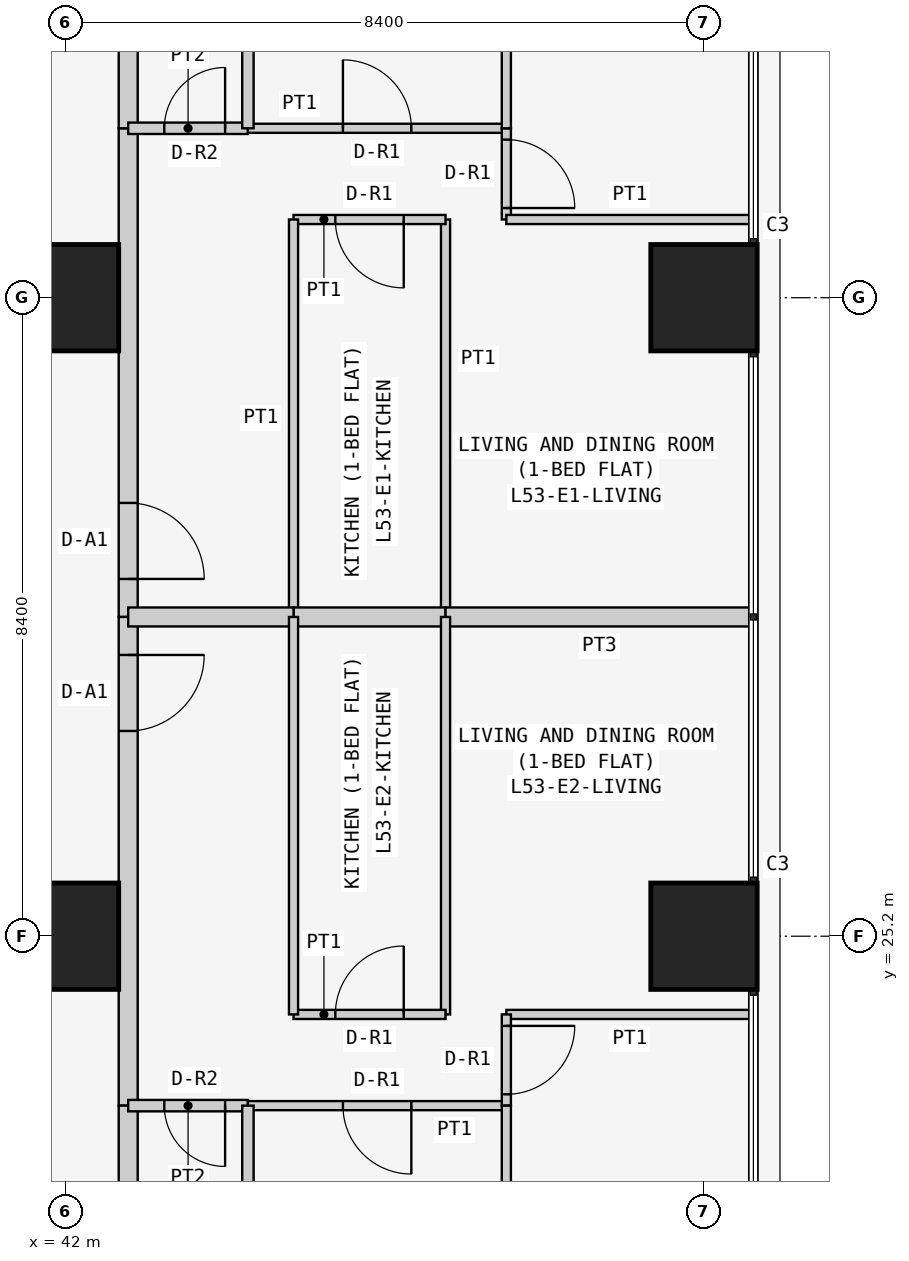
"""IFC4 building model, lengths in metres.
Left out: names, types, materials, properties, quantities, classifications, styles, units other than length and angle.
Written with IfcOpenShell. Run it as: python <this file> out.ifc"""

import sys

from ifc_helpers import new_model, si_unit, direction, frame, frame_2d, origin, origin_2d, place, context, subcontext, project, spatial, rectangle, extrude, element, fill, save


model = new_model("IFC4")
c1 = context("Model", 3, precision=1e-05, world=origin(), true_north=direction((0.0, 1.0)))
c2 = subcontext(c1, "Body", "Model", "MODEL_VIEW")
j1 = project(units=[si_unit("LENGTHUNIT", "METRE"), si_unit("PLANEANGLEUNIT", "RADIAN")], contexts=[c1])
p1 = place(None, origin())
s1 = spatial("IfcSite", under=j1, at=p1, CompositionType="ELEMENT")
p2 = place(p1, origin())
s2 = spatial("IfcBuilding", under=s1, at=p2, CompositionType="ELEMENT")
p3 = place(p2, frame((0.0, 0.0, 204.9)))
s3 = spatial("IfcBuildingStorey", under=s2, at=p3, CompositionType="ELEMENT", Elevation=204.9)
for number, where, z_axis, x_axis in (
    (1, (42.0, 25.2, 0.0), (0.0, 0.0, 1.0), (1.0, 0.0, 0.0)),
    (2, (42.0, 33.6, 0.0), (0.0, 0.0, 1.0), (1.0, 0.0, 0.0)),
    (3, (50.4, 25.2, 0.0), (0.0, 0.0, 1.0), (1.0, 0.0, 0.0)),
    (4, (50.4, 33.6, 0.0), (0.0, 0.0, 1.0), (1.0, 0.0, 0.0)),
):
    element("IfcColumn", number, at=place(p3, frame(where, z_axis=z_axis, x_axis=x_axis)), inside=s3, PredefinedType="COLUMN", context=c2, shape_type="SweptSolid", body=[
        extrude(rectangle(XDim=1.4, YDim=1.4, at=origin_2d()), origin(), (0.0, 0.0, 1.0), 3.6),
    ])
p4 = place(p3, frame((42.825, 35.829, 0.0), z_axis=(0.0, 0.0, 1.0), x_axis=(0.0, -1.0, 0.0)))
e5 = element("IfcWall", 5, at=p4, inside=s3, PredefinedType="PARTITIONING", context=c2, shape_type="SweptSolid", body=[
    extrude(rectangle(XDim=6.429, YDim=0.25, at=frame_2d((3.215, 0.0))), origin(), (0.0, 0.0, 1.0), 3.45),
])
p5 = place(p4, frame((4.929, 0.0, 0.0)))
e6 = element("IfcOpeningElement", 6, at=p5, cuts=e5, PredefinedType="OPENING", context=c2, shape_type="SweptSolid", body=[
    extrude(rectangle(XDim=1.0, YDim=2.1, at=frame_2d((0.5, 1.05))), frame((0.0, 0.135, 0.0), z_axis=(0.0, -1.0, 0.0), x_axis=(1.0, 0.0, 0.0)), (0.0, 0.0, 1.0), 0.27),
])
p6 = place(p3, frame((42.825, 42.7, 0.0), z_axis=(0.0, 0.0, 1.0), x_axis=(0.0, -1.0, 0.0)))
e7 = element("IfcWall", 7, at=p6, inside=s3, PredefinedType="PARTITIONING", context=c2, shape_type="SweptSolid", body=[
    extrude(rectangle(XDim=6.871, YDim=0.25, at=frame_2d((3.436, 0.0))), origin(), (0.0, 0.0, 1.0), 3.45),
])
p7 = place(p3, frame((42.825, 29.4, 0.0), z_axis=(0.0, 0.0, 1.0), x_axis=(0.0, -1.0, 0.0)))
e8 = element("IfcWall", 8, at=p7, inside=s3, PredefinedType="PARTITIONING", context=c2, shape_type="SweptSolid", body=[
    extrude(rectangle(XDim=6.429, YDim=0.25, at=frame_2d((3.214, 0.0))), origin(), (0.0, 0.0, 1.0), 3.45),
])
p8 = place(p7, frame((0.5, 0.0, 0.0)))
e9 = element("IfcOpeningElement", 9, at=p8, cuts=e8, PredefinedType="OPENING", context=c2, shape_type="SweptSolid", body=[
    extrude(rectangle(XDim=1.0, YDim=2.1, at=frame_2d((0.5, 1.05))), frame((0.0, 0.135, 0.0), z_axis=(0.0, -1.0, 0.0), x_axis=(1.0, 0.0, 0.0)), (0.0, 0.0, 1.0), 0.27),
])
p9 = place(p3, frame((42.825, 22.971, 0.0), z_axis=(0.0, 0.0, 1.0), x_axis=(0.0, -1.0, 0.0)))
e10 = element("IfcWall", 10, at=p9, inside=s3, PredefinedType="PARTITIONING", context=c2, shape_type="SweptSolid", body=[
    extrude(rectangle(XDim=6.871, YDim=0.25, at=frame_2d((3.436, 0.0))), origin(), (0.0, 0.0, 1.0), 3.45),
])
p10 = place(p3, frame((47.0, 29.4, 0.0), z_axis=(0.0, 0.0, 1.0), x_axis=(0.0, 1.0, 0.0)))
e11 = element("IfcWall", 11, at=p10, inside=s3, PredefinedType="PARTITIONING", context=c2, shape_type="SweptSolid", body=[
    extrude(rectangle(XDim=5.229, YDim=0.12, at=frame_2d((2.615, 0.0))), origin(), (0.0, 0.0, 1.0), 3.45),
])
p11 = place(p3, frame((47.0, 34.629, 0.0), z_axis=(0.0, 0.0, 1.0), x_axis=(-1.0, 0.0, 0.0)))
e12 = element("IfcWall", 12, at=p11, inside=s3, PredefinedType="PARTITIONING", context=c2, shape_type="SweptSolid", body=[
    extrude(rectangle(XDim=2.0, YDim=0.12, at=frame_2d((1.0, 0.0))), origin(), (0.0, 0.0, 1.0), 3.45),
])
p12 = place(p11, frame((0.55, 0.0, 0.0)))
e13 = element("IfcOpeningElement", 13, at=p12, cuts=e12, PredefinedType="OPENING", context=c2, shape_type="SweptSolid", body=[
    extrude(rectangle(XDim=0.9, YDim=2.1, at=frame_2d((0.45, 1.05))), frame((0.0, 0.07, 0.0), z_axis=(0.0, -1.0, 0.0), x_axis=(1.0, 0.0, 0.0)), (0.0, 0.0, 1.0), 0.14),
])
p13 = place(p3, frame((45.0, 34.629, 0.0), z_axis=(0.0, 0.0, 1.0), x_axis=(0.0, -1.0, 0.0)))
e14 = element("IfcWall", 14, at=p13, inside=s3, PredefinedType="PARTITIONING", context=c2, shape_type="SweptSolid", body=[
    extrude(rectangle(XDim=5.229, YDim=0.12, at=frame_2d((2.615, 0.0))), origin(), (0.0, 0.0, 1.0), 3.45),
])
p14 = place(p3, frame((45.0, 29.4, 0.0), z_axis=(0.0, 0.0, 1.0), x_axis=(1.0, 0.0, 0.0)))
e15 = element("IfcWall", 15, at=p14, inside=s3, PredefinedType="PARTITIONING", context=c2, shape_type="SweptSolid", body=[
    extrude(rectangle(XDim=2.0, YDim=0.25, at=frame_2d((1.0, 0.0))), origin(), (0.0, 0.0, 1.0), 3.45),
])
p15 = place(p3, frame((42.825, 35.829, 0.0), z_axis=(0.0, 0.0, 1.0), x_axis=(1.0, 0.0, 0.0)))
e16 = element("IfcWall", 16, at=p15, inside=s3, PredefinedType="PARTITIONING", context=c2, shape_type="SweptSolid", body=[
    extrude(rectangle(XDim=1.575, YDim=0.15, at=frame_2d((0.788, 0.0))), origin(), (0.0, 0.0, 1.0), 3.45),
])
p16 = place(p15, frame((0.475, 0.0, 0.0)))
e17 = element("IfcOpeningElement", 17, at=p16, cuts=e16, PredefinedType="OPENING", context=c2, shape_type="SweptSolid", body=[
    extrude(rectangle(XDim=0.8, YDim=2.1, at=frame_2d((0.4, 1.05))), frame((0.0, 0.085, 0.0), z_axis=(0.0, -1.0, 0.0), x_axis=(1.0, 0.0, 0.0)), (0.0, 0.0, 1.0), 0.17),
])
p17 = place(p3, frame((44.4, 35.829, 0.0), z_axis=(0.0, 0.0, 1.0), x_axis=(1.0, 0.0, 0.0)))
e18 = element("IfcWall", 18, at=p17, inside=s3, PredefinedType="PARTITIONING", context=c2, shape_type="SweptSolid", body=[
    extrude(rectangle(XDim=3.4, YDim=0.12, at=frame_2d((1.7, 0.0))), origin(), (0.0, 0.0, 1.0), 3.45),
])
p18 = place(p17, frame((1.25, 0.0, 0.0)))
e19 = element("IfcOpeningElement", 19, at=p18, cuts=e18, PredefinedType="OPENING", context=c2, shape_type="SweptSolid", body=[
    extrude(rectangle(XDim=0.9, YDim=2.1, at=frame_2d((0.45, 1.05))), frame((0.0, 0.07, 0.0), z_axis=(0.0, -1.0, 0.0), x_axis=(1.0, 0.0, 0.0)), (0.0, 0.0, 1.0), 0.14),
])
p19 = place(p3, frame((47.8, 35.829, 0.0), z_axis=(0.0, 0.0, 1.0), x_axis=(0.0, -1.0, 0.0)))
e20 = element("IfcWall", 20, at=p19, inside=s3, PredefinedType="PARTITIONING", context=c2, shape_type="SweptSolid", body=[
    extrude(rectangle(XDim=1.2, YDim=0.12, at=frame_2d((0.6, 0.0))), origin(), (0.0, 0.0, 1.0), 3.45),
])
p20 = place(p19, frame((0.149, 0.0, 0.0)))
e21 = element("IfcOpeningElement", 21, at=p20, cuts=e20, PredefinedType="OPENING", context=c2, shape_type="SweptSolid", body=[
    extrude(rectangle(XDim=0.9, YDim=2.1, at=frame_2d((0.45, 1.05))), frame((0.0, 0.07, 0.0), z_axis=(0.0, -1.0, 0.0), x_axis=(1.0, 0.0, 0.0)), (0.0, 0.0, 1.0), 0.14),
])
p21 = place(p3, frame((47.8, 34.629, 0.0), z_axis=(0.0, 0.0, 1.0), x_axis=(1.0, 0.0, 0.0)))
e22 = element("IfcWall", 22, at=p21, inside=s3, PredefinedType="PARTITIONING", context=c2, shape_type="SweptSolid", body=[
    extrude(rectangle(XDim=3.25, YDim=0.12, at=frame_2d((1.625, 0.0))), origin(), (0.0, 0.0, 1.0), 3.45),
])
p22 = place(p3, frame((45.0, 29.4, 0.0), z_axis=(0.0, 0.0, 1.0), x_axis=(-1.0, 0.0, 0.0)))
e23 = element("IfcWall", 23, at=p22, inside=s3, PredefinedType="PARTITIONING", context=c2, shape_type="SweptSolid", body=[
    extrude(rectangle(XDim=2.175, YDim=0.25, at=frame_2d((1.087, 0.0))), origin(), (0.0, 0.0, 1.0), 3.45),
])
p23 = place(p3, frame((51.05, 29.4, 0.0), z_axis=(0.0, 0.0, 1.0), x_axis=(-1.0, 0.0, 0.0)))
e24 = element("IfcWall", 24, at=p23, inside=s3, PredefinedType="PARTITIONING", context=c2, shape_type="SweptSolid", body=[
    extrude(rectangle(XDim=4.05, YDim=0.25, at=frame_2d((2.025, 0.0))), origin(), (0.0, 0.0, 1.0), 3.45),
])
p24 = place(p3, frame((44.4, 35.829, 0.0), z_axis=(0.0, 0.0, 1.0), x_axis=(0.0, 1.0, 0.0)))
e25 = element("IfcWall", 25, at=p24, inside=s3, PredefinedType="PARTITIONING", context=c2, shape_type="SweptSolid", body=[
    extrude(rectangle(XDim=6.871, YDim=0.15, at=frame_2d((3.436, 0.0))), origin(), (0.0, 0.0, 1.0), 3.45),
])
p25 = place(p3, frame((47.8, 35.829, 0.0), z_axis=(0.0, 0.0, 1.0), x_axis=(0.0, 1.0, 0.0)))
e26 = element("IfcWall", 26, at=p25, inside=s3, PredefinedType="PARTITIONING", context=c2, shape_type="SweptSolid", body=[
    extrude(rectangle(XDim=6.871, YDim=0.12, at=frame_2d((3.436, 0.0))), origin(), (0.0, 0.0, 1.0), 3.45),
])
p26 = place(p3, frame((47.0, 29.4, 0.0), z_axis=(0.0, 0.0, 1.0), x_axis=(0.0, -1.0, 0.0)))
e27 = element("IfcWall", 27, at=p26, inside=s3, PredefinedType="PARTITIONING", context=c2, shape_type="SweptSolid", body=[
    extrude(rectangle(XDim=5.229, YDim=0.12, at=frame_2d((2.615, 0.0))), origin(), (0.0, 0.0, 1.0), 3.45),
])
p27 = place(p3, frame((47.0, 24.171, 0.0), z_axis=(0.0, 0.0, 1.0), x_axis=(-1.0, 0.0, 0.0)))
e28 = element("IfcWall", 28, at=p27, inside=s3, PredefinedType="PARTITIONING", context=c2, shape_type="SweptSolid", body=[
    extrude(rectangle(XDim=2.0, YDim=0.12, at=frame_2d((1.0, 0.0))), origin(), (0.0, 0.0, 1.0), 3.45),
])
p28 = place(p27, frame((0.55, 0.0, 0.0)))
e29 = element("IfcOpeningElement", 29, at=p28, cuts=e28, PredefinedType="OPENING", context=c2, shape_type="SweptSolid", body=[
    extrude(rectangle(XDim=0.9, YDim=2.1, at=frame_2d((0.45, 1.05))), frame((0.0, 0.07, 0.0), z_axis=(0.0, -1.0, 0.0), x_axis=(1.0, 0.0, 0.0)), (0.0, 0.0, 1.0), 0.14),
])
p29 = place(p3, frame((45.0, 24.171, 0.0), z_axis=(0.0, 0.0, 1.0), x_axis=(0.0, 1.0, 0.0)))
e30 = element("IfcWall", 30, at=p29, inside=s3, PredefinedType="PARTITIONING", context=c2, shape_type="SweptSolid", body=[
    extrude(rectangle(XDim=5.229, YDim=0.12, at=frame_2d((2.615, 0.0))), origin(), (0.0, 0.0, 1.0), 3.45),
])
p30 = place(p3, frame((44.4, 22.971, 0.0), z_axis=(0.0, 0.0, 1.0), x_axis=(-1.0, 0.0, 0.0)))
e31 = element("IfcWall", 31, at=p30, inside=s3, PredefinedType="PARTITIONING", context=c2, shape_type="SweptSolid", body=[
    extrude(rectangle(XDim=1.575, YDim=0.15, at=frame_2d((0.788, 0.0))), origin(), (0.0, 0.0, 1.0), 3.45),
])
p31 = place(p30, frame((0.3, 0.0, 0.0)))
e32 = element("IfcOpeningElement", 32, at=p31, cuts=e31, PredefinedType="OPENING", context=c2, shape_type="SweptSolid", body=[
    extrude(rectangle(XDim=0.8, YDim=2.1, at=frame_2d((0.4, 1.05))), frame((0.0, 0.085, 0.0), z_axis=(0.0, -1.0, 0.0), x_axis=(1.0, 0.0, 0.0)), (0.0, 0.0, 1.0), 0.17),
])
p32 = place(p3, frame((47.8, 22.971, 0.0), z_axis=(0.0, 0.0, 1.0), x_axis=(-1.0, 0.0, 0.0)))
e33 = element("IfcWall", 33, at=p32, inside=s3, PredefinedType="PARTITIONING", context=c2, shape_type="SweptSolid", body=[
    extrude(rectangle(XDim=3.4, YDim=0.12, at=frame_2d((1.7, 0.0))), origin(), (0.0, 0.0, 1.0), 3.45),
])
p33 = place(p32, frame((1.25, 0.0, 0.0)))
e34 = element("IfcOpeningElement", 34, at=p33, cuts=e33, PredefinedType="OPENING", context=c2, shape_type="SweptSolid", body=[
    extrude(rectangle(XDim=0.9, YDim=2.1, at=frame_2d((0.45, 1.05))), frame((0.0, 0.07, 0.0), z_axis=(0.0, -1.0, 0.0), x_axis=(1.0, 0.0, 0.0)), (0.0, 0.0, 1.0), 0.14),
])
p34 = place(p3, frame((51.05, 24.171, 0.0), z_axis=(0.0, 0.0, 1.0), x_axis=(-1.0, 0.0, 0.0)))
e35 = element("IfcWall", 35, at=p34, inside=s3, PredefinedType="PARTITIONING", context=c2, shape_type="SweptSolid", body=[
    extrude(rectangle(XDim=3.25, YDim=0.12, at=frame_2d((1.625, 0.0))), origin(), (0.0, 0.0, 1.0), 3.45),
])
p35 = place(p3, frame((47.8, 24.171, 0.0), z_axis=(0.0, 0.0, 1.0), x_axis=(0.0, -1.0, 0.0)))
e36 = element("IfcWall", 36, at=p35, inside=s3, PredefinedType="PARTITIONING", context=c2, shape_type="SweptSolid", body=[
    extrude(rectangle(XDim=1.2, YDim=0.12, at=frame_2d((0.6, 0.0))), origin(), (0.0, 0.0, 1.0), 3.45),
])
p36 = place(p35, frame((0.151, 0.0, 0.0)))
e37 = element("IfcOpeningElement", 37, at=p36, cuts=e36, PredefinedType="OPENING", context=c2, shape_type="SweptSolid", body=[
    extrude(rectangle(XDim=0.9, YDim=2.1, at=frame_2d((0.45, 1.05))), frame((0.0, 0.07, 0.0), z_axis=(0.0, -1.0, 0.0), x_axis=(1.0, 0.0, 0.0)), (0.0, 0.0, 1.0), 0.14),
])
p37 = place(p3, frame((44.4, 22.971, 0.0), z_axis=(0.0, 0.0, 1.0), x_axis=(0.0, -1.0, 0.0)))
e38 = element("IfcWall", 38, at=p37, inside=s3, PredefinedType="PARTITIONING", context=c2, shape_type="SweptSolid", body=[
    extrude(rectangle(XDim=6.871, YDim=0.15, at=frame_2d((3.436, 0.0))), origin(), (0.0, 0.0, 1.0), 3.45),
])
p38 = place(p3, frame((47.8, 22.971, 0.0), z_axis=(0.0, 0.0, 1.0), x_axis=(0.0, -1.0, 0.0)))
e39 = element("IfcWall", 39, at=p38, inside=s3, PredefinedType="PARTITIONING", context=c2, shape_type="SweptSolid", body=[
    extrude(rectangle(XDim=6.871, YDim=0.12, at=frame_2d((3.436, 0.0))), origin(), (0.0, 0.0, 1.0), 3.45),
])
p39 = place(p5, origin())
e40 = element("IfcDoor", 40, at=p39, inside=s3, OperationType="SINGLE_SWING_RIGHT", PredefinedType="DOOR", context=c2, shape_type="SweptSolid", body=[
    extrude(rectangle(XDim=1.0, YDim=2.1, at=frame_2d((0.5, 1.05))), frame((0.0, 0.025, 0.0), z_axis=(0.0, -1.0, 0.0), x_axis=(1.0, 0.0, 0.0)), (0.0, 0.0, 1.0), 0.05),
])
fill(e6, e40)
p40 = place(p12, origin())
e41 = element("IfcDoor", 41, at=p40, inside=s3, OperationType="SINGLE_SWING_LEFT", PredefinedType="DOOR", context=c2, shape_type="SweptSolid", body=[
    extrude(rectangle(XDim=0.9, YDim=2.1, at=frame_2d((0.45, 1.05))), frame((0.0, 0.025, 0.0), z_axis=(0.0, -1.0, 0.0), x_axis=(1.0, 0.0, 0.0)), (0.0, 0.0, 1.0), 0.05),
])
fill(e13, e41)
p41 = place(p16, origin())
e42 = element("IfcDoor", 42, at=p41, inside=s3, OperationType="SINGLE_SWING_RIGHT", PredefinedType="DOOR", context=c2, shape_type="SweptSolid", body=[
    extrude(rectangle(XDim=0.8, YDim=2.1, at=frame_2d((0.4, 1.05))), frame((0.0, 0.025, 0.0), z_axis=(0.0, -1.0, 0.0), x_axis=(1.0, 0.0, 0.0)), (0.0, 0.0, 1.0), 0.05),
])
fill(e17, e42)
p42 = place(p18, origin())
e43 = element("IfcDoor", 43, at=p42, inside=s3, OperationType="SINGLE_SWING_LEFT", PredefinedType="DOOR", context=c2, shape_type="SweptSolid", body=[
    extrude(rectangle(XDim=0.9, YDim=2.1, at=frame_2d((0.45, 1.05))), frame((0.0, 0.025, 0.0), z_axis=(0.0, -1.0, 0.0), x_axis=(1.0, 0.0, 0.0)), (0.0, 0.0, 1.0), 0.05),
])
fill(e19, e43)
p43 = place(p20, origin())
e44 = element("IfcDoor", 44, at=p43, inside=s3, OperationType="SINGLE_SWING_RIGHT", PredefinedType="DOOR", context=c2, shape_type="SweptSolid", body=[
    extrude(rectangle(XDim=0.9, YDim=2.1, at=frame_2d((0.45, 1.05))), frame((0.0, 0.025, 0.0), z_axis=(0.0, -1.0, 0.0), x_axis=(1.0, 0.0, 0.0)), (0.0, 0.0, 1.0), 0.05),
])
fill(e21, e44)
p44 = place(p8, origin())
e45 = element("IfcDoor", 45, at=p44, inside=s3, OperationType="SINGLE_SWING_LEFT", PredefinedType="DOOR", context=c2, shape_type="SweptSolid", body=[
    extrude(rectangle(XDim=1.0, YDim=2.1, at=frame_2d((0.5, 1.05))), frame((0.0, 0.025, 0.0), z_axis=(0.0, -1.0, 0.0), x_axis=(1.0, 0.0, 0.0)), (0.0, 0.0, 1.0), 0.05),
])
fill(e9, e45)
p45 = place(p28, frame((0.9, 0.0, 0.0), z_axis=(0.0, 0.0, 1.0), x_axis=(-1.0, 0.0, 0.0)))
e46 = element("IfcDoor", 46, at=p45, inside=s3, OperationType="SINGLE_SWING_RIGHT", PredefinedType="DOOR", context=c2, shape_type="SweptSolid", body=[
    extrude(rectangle(XDim=0.9, YDim=2.1, at=frame_2d((0.45, 1.05))), frame((0.0, 0.025, 0.0), z_axis=(0.0, -1.0, 0.0), x_axis=(1.0, 0.0, 0.0)), (0.0, 0.0, 1.0), 0.05),
])
fill(e29, e46)
p46 = place(p31, origin())
e47 = element("IfcDoor", 47, at=p46, inside=s3, OperationType="SINGLE_SWING_LEFT", PredefinedType="DOOR", context=c2, shape_type="SweptSolid", body=[
    extrude(rectangle(XDim=0.8, YDim=2.1, at=frame_2d((0.4, 1.05))), frame((0.0, 0.025, 0.0), z_axis=(0.0, -1.0, 0.0), x_axis=(1.0, 0.0, 0.0)), (0.0, 0.0, 1.0), 0.05),
])
fill(e32, e47)
p47 = place(p33, origin())
e48 = element("IfcDoor", 48, at=p47, inside=s3, OperationType="SINGLE_SWING_LEFT", PredefinedType="DOOR", context=c2, shape_type="SweptSolid", body=[
    extrude(rectangle(XDim=0.9, YDim=2.1, at=frame_2d((0.45, 1.05))), frame((0.0, 0.025, 0.0), z_axis=(0.0, -1.0, 0.0), x_axis=(1.0, 0.0, 0.0)), (0.0, 0.0, 1.0), 0.05),
])
fill(e34, e48)
p48 = place(p36, origin())
e49 = element("IfcDoor", 49, at=p48, inside=s3, OperationType="SINGLE_SWING_LEFT", PredefinedType="DOOR", context=c2, shape_type="SweptSolid", body=[
    extrude(rectangle(XDim=0.9, YDim=2.1, at=frame_2d((0.45, 1.05))), frame((0.0, 0.025, 0.0), z_axis=(0.0, -1.0, 0.0), x_axis=(1.0, 0.0, 0.0)), (0.0, 0.0, 1.0), 0.05),
])
fill(e37, e49)
save(model, sys.argv[1])
